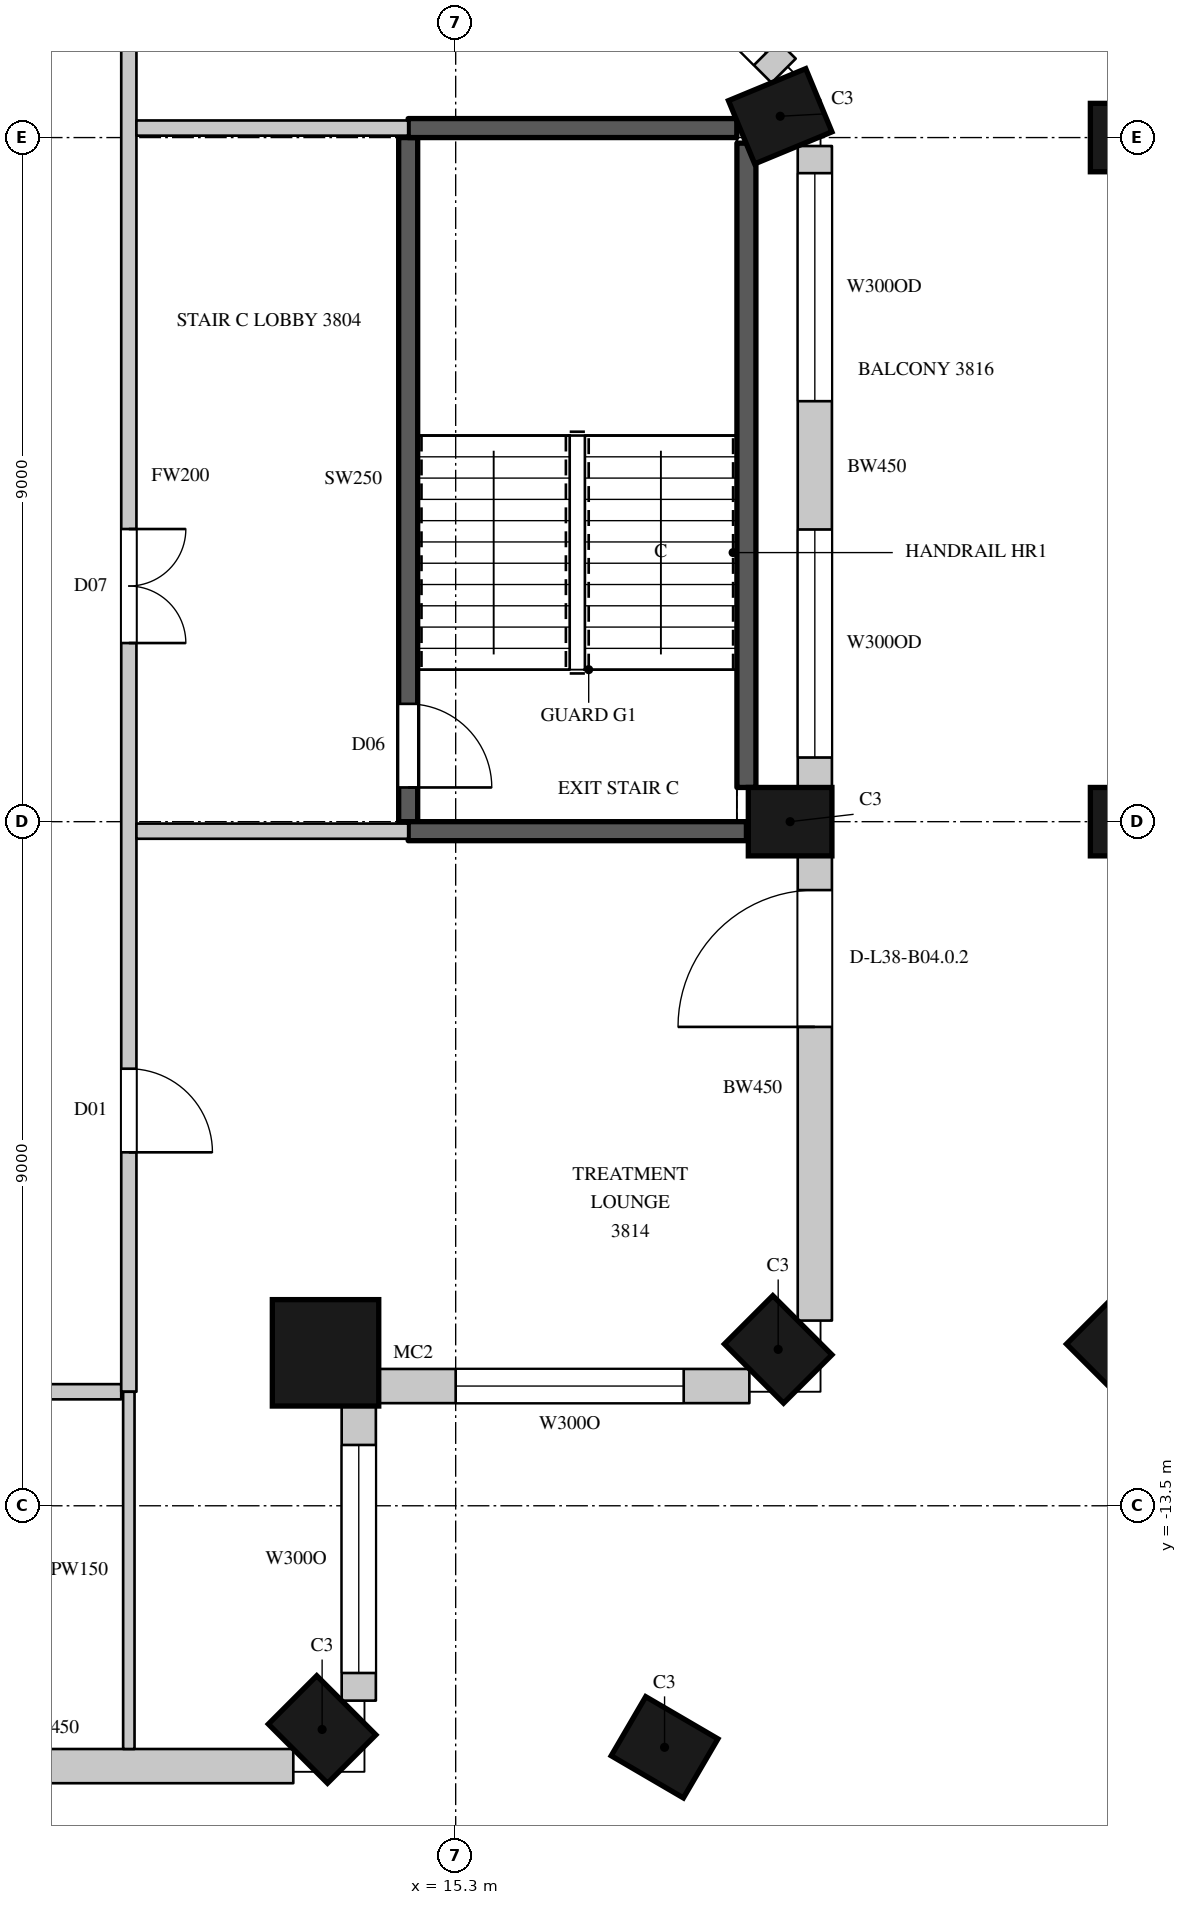
"""IFC4 building model, lengths in metres.
Left out: names, types, materials, properties, quantities, classifications, styles, units other than length and angle.
Written with IfcOpenShell. Run it as: python <this file> out.ifc"""

import sys

from ifc_helpers import new_model, si_unit, direction, frame, frame_2d, origin, origin_2d, place, context, subcontext, project, spatial, rectangle, circle, extrude, element, fill, save


model = new_model("IFC4")
c1 = context("Model", 3, precision=1e-05, world=origin(), true_north=direction((0.0, 1.0)))
c2 = subcontext(c1, "Body", "Model", "MODEL_VIEW")
j1 = project(units=[si_unit("LENGTHUNIT", "METRE"), si_unit("PLANEANGLEUNIT", "RADIAN")], contexts=[c1])
p1 = place(None, origin())
s1 = spatial("IfcSite", under=j1, at=p1, CompositionType="ELEMENT")
p2 = place(p1, origin())
s2 = spatial("IfcBuilding", under=s1, at=p2, CompositionType="ELEMENT")
p3 = place(p2, frame((0.0, 0.0, 176.9)))
s3 = spatial("IfcBuildingStorey", under=s2, at=p3, CompositionType="ELEMENT", Elevation=176.9)
p4 = place(p3, frame((13.543, -16.443, 0.0), z_axis=(0.0, 0.0, 1.0), x_axis=(0.707106781187, 0.707106781187, 0.0)))
e1 = element("IfcColumn", 1, at=p4, inside=s3, PredefinedType="COLUMN", context=c2, shape_type="SweptSolid", body=[
    extrude(rectangle(XDim=0.9, YDim=1.1, at=origin_2d()), origin(), (0.0, 0.0, 1.0), 4.1),
])
p5 = place(p3, frame((13.588, -11.488, 0.0), z_axis=(0.0, 0.0, 1.0), x_axis=(1.0, 0.0, 0.0)))
e2 = element("IfcColumn", 2, at=p5, inside=s3, PredefinedType="COLUMN", context=c2, shape_type="SweptSolid", body=[
    extrude(circle(Radius=0.7, at=origin_2d()), origin(), (0.0, 0.0, 1.0), 4.1),
])
for number, where, z_axis, x_axis in (
    (3, (19.543, -11.443, 0.0), (0.0, 0.0, 1.0), (0.707, 0.707, 0.0)),
    (4, (19.7, -4.5, 0.0), (0.0, 0.0, 1.0), (0.0, 1.0, 0.0)),
    (5, (19.57, 4.78, 0.0), (0.0, 0.0, 1.0), (-0.383, 0.924, 0.0)),
    (6, (18.048, -16.677, 0.0), (0.0, 0.0, 1.0), (0.504, 0.863, 0.0)),
    (7, (24.043, -11.443, 0.0), (0.0, 0.0, 1.0), (0.707, 0.707, 0.0)),
    (8, (24.2, -4.5, 0.0), (0.0, 0.0, 1.0), (0.0, 1.0, 0.0)),
    (9, (24.2, 4.5, 0.0), (0.0, 0.0, 1.0), (0.0, 1.0, 0.0)),
):
    element("IfcColumn", number, at=place(p3, frame(where, z_axis=z_axis, x_axis=x_axis)), inside=s3, PredefinedType="COLUMN", context=c2, shape_type="SweptSolid", body=[
        extrude(rectangle(XDim=0.9, YDim=1.1, at=origin_2d()), origin(), (0.0, 0.0, 1.0), 4.1),
    ])
p6 = place(p3, frame((6.75, -16.925, 0.0), z_axis=(0.0, 0.0, 1.0), x_axis=(1.0, 0.0, 0.0)))
e10 = element("IfcWall", 10, at=p6, inside=s3, PredefinedType="SOLIDWALL", context=c2, shape_type="SweptSolid", body=[
    extrude(rectangle(XDim=6.414, YDim=0.45, at=frame_2d((3.207, 0.0))), origin(), (0.0, 0.0, 1.0), 3.8),
])
p7 = place(p6, frame((0.525, 0.0, 0.0)))
e11 = element("IfcOpeningElement", 11, at=p7, cuts=e10, PredefinedType="OPENING", context=c2, shape_type="SweptSolid", body=[
    extrude(rectangle(XDim=1.8, YDim=2.4, at=frame_2d((0.9, 1.2))), frame((0.0, 0.235, 0.0), z_axis=(0.0, -1.0, 0.0), x_axis=(1.0, 0.0, 0.0)), (0.0, 0.0, 1.0), 0.47),
])
p8 = place(p3, frame((14.025, -16.064, 0.0), z_axis=(0.0, 0.0, 1.0), x_axis=(0.0, 1.0, 0.0)))
e12 = element("IfcWall", 12, at=p8, inside=s3, PredefinedType="SOLIDWALL", context=c2, shape_type="SweptSolid", body=[
    extrude(rectangle(XDim=3.909, YDim=0.45, at=frame_2d((1.955, 0.0))), origin(), (0.0, 0.0, 1.0), 3.8),
])
p9 = place(p8, frame((0.364, 0.0, 1.05)))
e13 = element("IfcOpeningElement", 13, at=p9, cuts=e12, PredefinedType="OPENING", context=c2, shape_type="SweptSolid", body=[
    extrude(rectangle(XDim=3.0, YDim=2.4, at=frame_2d((1.5, 1.2))), frame((0.0, 0.235, 0.0), z_axis=(0.0, -1.0, 0.0), x_axis=(1.0, 0.0, 0.0)), (0.0, 0.0, 1.0), 0.47),
])
p10 = place(p3, frame((14.255, -11.925, 0.0), z_axis=(0.0, 0.0, 1.0), x_axis=(1.0, 0.0, 0.0)))
e14 = element("IfcWall", 14, at=p10, inside=s3, PredefinedType="SOLIDWALL", context=c2, shape_type="SweptSolid", body=[
    extrude(rectangle(XDim=4.909, YDim=0.45, at=frame_2d((2.455, 0.0))), origin(), (0.0, 0.0, 1.0), 3.8),
])
p11 = place(p10, frame((1.045, 0.0, 1.05)))
e15 = element("IfcOpeningElement", 15, at=p11, cuts=e14, PredefinedType="OPENING", context=c2, shape_type="SweptSolid", body=[
    extrude(rectangle(XDim=3.0, YDim=2.4, at=frame_2d((1.5, 1.2))), frame((0.0, 0.235, 0.0), z_axis=(0.0, -1.0, 0.0), x_axis=(1.0, 0.0, 0.0)), (0.0, 0.0, 1.0), 0.47),
])
p12 = place(p3, frame((20.025, -11.064, 0.0), z_axis=(0.0, 0.0, 1.0), x_axis=(0.0, 1.0, 0.0)))
e16 = element("IfcWall", 16, at=p12, inside=s3, PredefinedType="SOLIDWALL", context=c2, shape_type="SweptSolid", body=[
    extrude(rectangle(XDim=6.114, YDim=0.45, at=frame_2d((3.057, 0.0))), origin(), (0.0, 0.0, 1.0), 3.8),
])
p13 = place(p12, frame((3.864, 0.0, 0.0)))
e17 = element("IfcOpeningElement", 17, at=p13, cuts=e16, PredefinedType="OPENING", context=c2, shape_type="SweptSolid", body=[
    extrude(rectangle(XDim=1.8, YDim=2.4, at=frame_2d((0.9, 1.2))), frame((0.0, 0.235, 0.0), z_axis=(0.0, -1.0, 0.0), x_axis=(1.0, 0.0, 0.0)), (0.0, 0.0, 1.0), 0.47),
])
p14 = place(p3, frame((20.025, -4.05, 0.0), z_axis=(0.0, 0.0, 1.0), x_axis=(0.0, 1.0, 0.0)))
e18 = element("IfcWall", 18, at=p14, inside=s3, PredefinedType="SOLIDWALL", context=c2, shape_type="SweptSolid", body=[
    extrude(rectangle(XDim=8.439, YDim=0.45, at=frame_2d((4.219, 0.0))), origin(), (0.0, 0.0, 1.0), 3.8),
])
p15 = place(p14, frame((0.394, 0.0, 1.05)))
e19 = element("IfcOpeningElement", 19, at=p15, cuts=e18, PredefinedType="OPENING", context=c2, shape_type="SweptSolid", body=[
    extrude(rectangle(XDim=3.0, YDim=2.4, at=frame_2d((1.5, 1.2))), frame((0.0, 0.235, 0.0), z_axis=(0.0, -1.0, 0.0), x_axis=(1.0, 0.0, 0.0)), (0.0, 0.0, 1.0), 0.47),
])
p16 = place(p14, frame((5.082, 0.0, 1.05)))
e20 = element("IfcOpeningElement", 20, at=p16, cuts=e18, PredefinedType="OPENING", context=c2, shape_type="SweptSolid", body=[
    extrude(rectangle(XDim=3.0, YDim=2.4, at=frame_2d((1.5, 1.2))), frame((0.0, 0.235, 0.0), z_axis=(0.0, -1.0, 0.0), x_axis=(1.0, 0.0, 0.0)), (0.0, 0.0, 1.0), 0.47),
])
p17 = place(p3, frame((19.615, 5.379, 0.0), z_axis=(0.0, 0.0, 1.0), x_axis=(-0.707089646058, 0.7071239159, 0.0)))
e21 = element("IfcWall", 21, at=p17, inside=s3, PredefinedType="SOLIDWALL", context=c2, shape_type="SweptSolid", body=[
    extrude(rectangle(XDim=7.124, YDim=0.45, at=frame_2d((3.562, 0.0))), origin(), (0.0, 0.0, 1.0), 3.8),
])
p18 = place(p17, frame((0.328, 0.0, 1.05)))
e22 = element("IfcOpeningElement", 22, at=p18, cuts=e21, PredefinedType="OPENING", context=c2, shape_type="SweptSolid", body=[
    extrude(rectangle(XDim=2.4, YDim=2.4, at=frame_2d((1.2, 1.2))), frame((0.0, 0.235, 0.0), z_axis=(0.0, -1.0, 0.0), x_axis=(1.0, 0.0, 0.0)), (0.0, 0.0, 1.0), 0.47),
])
p19 = place(p17, frame((4.359, 0.0, 1.05)))
e23 = element("IfcOpeningElement", 23, at=p19, cuts=e21, PredefinedType="OPENING", context=c2, shape_type="SweptSolid", body=[
    extrude(rectangle(XDim=2.4, YDim=2.4, at=frame_2d((1.2, 1.2))), frame((0.0, 0.235, 0.0), z_axis=(0.0, -1.0, 0.0), x_axis=(1.0, 0.0, 0.0)), (0.0, 0.0, 1.0), 0.47),
])
p20 = place(p3, frame((21.1, -0.617, 0.0), z_axis=(0.0, 0.0, 1.0), x_axis=(0.0, 1.0, 0.0)))
e24 = element("IfcWall", 24, at=p20, inside=s3, PredefinedType="SOLIDWALL", context=c2, shape_type="SweptSolid", body=[
    extrude(rectangle(XDim=2.567, YDim=0.45, at=frame_2d((1.283, 0.0))), origin(), (0.0, 0.0, 1.0), 0.6),
])
p21 = place(p3, frame((-10.9, -12.0, 0.0), z_axis=(0.0, 0.0, 1.0), x_axis=(1.0, 0.0, 0.0)))
e25 = element("IfcWall", 25, at=p21, inside=s3, PredefinedType="PARTITIONING", context=c2, shape_type="SweptSolid", body=[
    extrude(rectangle(XDim=21.8, YDim=0.2, at=frame_2d((10.9, 0.0))), origin(), (0.0, 0.0, 1.0), 3.8),
])
p22 = place(p21, frame((0.95, 0.0, 0.0)))
e26 = element("IfcOpeningElement", 26, at=p22, cuts=e25, PredefinedType="OPENING", context=c2, shape_type="SweptSolid", body=[
    extrude(rectangle(XDim=0.9, YDim=2.2, at=frame_2d((0.45, 1.1))), frame((0.0, 0.11, 0.0), z_axis=(0.0, -1.0, 0.0), x_axis=(1.0, 0.0, 0.0)), (0.0, 0.0, 1.0), 0.22),
])
p23 = place(p21, frame((3.95, 0.0, 0.0)))
e27 = element("IfcOpeningElement", 27, at=p23, cuts=e25, PredefinedType="OPENING", context=c2, shape_type="SweptSolid", body=[
    extrude(rectangle(XDim=0.9, YDim=2.2, at=frame_2d((0.45, 1.1))), frame((0.0, 0.11, 0.0), z_axis=(0.0, -1.0, 0.0), x_axis=(1.0, 0.0, 0.0)), (0.0, 0.0, 1.0), 0.22),
])
p24 = place(p21, frame((6.7, 0.0, 0.0)))
e28 = element("IfcOpeningElement", 28, at=p24, cuts=e25, PredefinedType="OPENING", context=c2, shape_type="SweptSolid", body=[
    extrude(rectangle(XDim=0.9, YDim=2.2, at=frame_2d((0.45, 1.1))), frame((0.0, 0.11, 0.0), z_axis=(0.0, -1.0, 0.0), x_axis=(1.0, 0.0, 0.0)), (0.0, 0.0, 1.0), 0.22),
])
p25 = place(p21, frame((10.0, 0.0, 0.0)))
e29 = element("IfcOpeningElement", 29, at=p25, cuts=e25, PredefinedType="OPENING", context=c2, shape_type="SweptSolid", body=[
    extrude(rectangle(XDim=0.9, YDim=2.2, at=frame_2d((0.45, 1.1))), frame((0.0, 0.11, 0.0), z_axis=(0.0, -1.0, 0.0), x_axis=(1.0, 0.0, 0.0)), (0.0, 0.0, 1.0), 0.22),
])
p26 = place(p21, frame((13.55, 0.0, 0.0)))
e30 = element("IfcOpeningElement", 30, at=p26, cuts=e25, PredefinedType="OPENING", context=c2, shape_type="SweptSolid", body=[
    extrude(rectangle(XDim=0.9, YDim=2.2, at=frame_2d((0.45, 1.1))), frame((0.0, 0.11, 0.0), z_axis=(0.0, -1.0, 0.0), x_axis=(1.0, 0.0, 0.0)), (0.0, 0.0, 1.0), 0.22),
])
p27 = place(p21, frame((15.8, 0.0, 0.0)))
e31 = element("IfcOpeningElement", 31, at=p27, cuts=e25, PredefinedType="OPENING", context=c2, shape_type="SweptSolid", body=[
    extrude(rectangle(XDim=1.1, YDim=2.4, at=frame_2d((0.55, 1.2))), frame((0.0, 0.11, 0.0), z_axis=(0.0, -1.0, 0.0), x_axis=(1.0, 0.0, 0.0)), (0.0, 0.0, 1.0), 0.22),
])
p28 = place(p21, frame((18.0, 0.0, 0.0)))
e32 = element("IfcOpeningElement", 32, at=p28, cuts=e25, PredefinedType="OPENING", context=c2, shape_type="SweptSolid", body=[
    extrude(rectangle(XDim=1.1, YDim=2.4, at=frame_2d((0.55, 1.2))), frame((0.0, 0.11, 0.0), z_axis=(0.0, -1.0, 0.0), x_axis=(1.0, 0.0, 0.0)), (0.0, 0.0, 1.0), 0.22),
])
p29 = place(p3, frame((11.0, -12.0, 0.0), z_axis=(0.0, 0.0, 1.0), x_axis=(0.0, 1.0, 0.0)))
e33 = element("IfcWall", 33, at=p29, inside=s3, PredefinedType="PARTITIONING", context=c2, shape_type="SweptSolid", body=[
    extrude(rectangle(XDim=24.1, YDim=0.2, at=frame_2d((12.05, 0.0))), origin(), (0.0, 0.0, 1.0), 3.8),
])
p30 = place(p29, frame((9.85, 0.0, 0.0)))
e34 = element("IfcOpeningElement", 34, at=p30, cuts=e33, PredefinedType="OPENING", context=c2, shape_type="SweptSolid", body=[
    extrude(rectangle(XDim=1.5, YDim=2.4, at=frame_2d((0.75, 1.2))), frame((0.0, 0.11, 0.0), z_axis=(0.0, -1.0, 0.0), x_axis=(1.0, 0.0, 0.0)), (0.0, 0.0, 1.0), 0.22),
])
p31 = place(p29, frame((3.15, 0.0, 0.0)))
e35 = element("IfcOpeningElement", 35, at=p31, cuts=e33, PredefinedType="OPENING", context=c2, shape_type="SweptSolid", body=[
    extrude(rectangle(XDim=1.1, YDim=2.4, at=frame_2d((0.55, 1.2))), frame((0.0, 0.11, 0.0), z_axis=(0.0, -1.0, 0.0), x_axis=(1.0, 0.0, 0.0)), (0.0, 0.0, 1.0), 0.22),
])
for number, where, z_axis, x_axis in (
    (36, (11.1, -4.625, 0.0), (0.0, 0.0, 1.0), (1.0, 0.0, 0.0)),
    (37, (11.1, 4.625, 0.0), (0.0, 0.0, 1.0), (1.0, 0.0, 0.0)),
):
    element("IfcWall", number, at=place(p3, frame(where, z_axis=z_axis, x_axis=x_axis)), inside=s3, PredefinedType="PARTITIONING", context=c2, shape_type="SweptSolid", body=[
        extrude(rectangle(XDim=3.575, YDim=0.2, at=frame_2d((1.788, 0.0))), origin(), (0.0, 0.0, 1.0), 3.8),
    ])
p32 = place(p3, frame((11.0, -16.7, 0.0), z_axis=(0.0, 0.0, 1.0), x_axis=(0.0, 1.0, 0.0)))
e38 = element("IfcWall", 38, at=p32, inside=s3, PredefinedType="PARTITIONING", context=c2, shape_type="SweptSolid", body=[
    extrude(rectangle(XDim=4.7, YDim=0.15, at=frame_2d((2.35, 0.0))), origin(), (0.0, 0.0, 1.0), 3.8),
])
p33 = place(p3, frame((14.675, -4.5, 0.0), z_axis=(0.0, 0.0, 1.0), x_axis=(0.0, 1.0, 0.0)))
e39 = element("IfcWall", 39, at=p33, inside=s3, PredefinedType="SHEAR", context=c2, shape_type="SweptSolid", body=[
    extrude(rectangle(XDim=9.0, YDim=0.25, at=frame_2d((4.5, 0.0))), origin(), (0.0, 0.0, 1.0), 3.8),
])
p34 = place(p33, frame((0.45, 0.0, 0.0)))
e40 = element("IfcOpeningElement", 40, at=p34, cuts=e39, PredefinedType="OPENING", context=c2, shape_type="SweptSolid", body=[
    extrude(rectangle(XDim=1.1, YDim=2.2, at=frame_2d((0.55, 1.1))), frame((0.0, 0.135, 0.0), z_axis=(0.0, -1.0, 0.0), x_axis=(1.0, 0.0, 0.0)), (0.0, 0.0, 1.0), 0.27),
])
p35 = place(p3, frame((14.675, -4.625, 0.0), z_axis=(0.0, 0.0, 1.0), x_axis=(1.0, 0.0, 0.0)))
e41 = element("IfcWall", 41, at=p35, inside=s3, PredefinedType="SHEAR", context=c2, shape_type="SweptSolid", body=[
    extrude(rectangle(XDim=4.45, YDim=0.25, at=frame_2d((2.225, 0.0))), origin(), (0.0, 0.0, 1.0), 3.8),
])
p36 = place(p3, frame((14.675, 4.625, 0.0), z_axis=(0.0, 0.0, 1.0), x_axis=(1.0, 0.0, 0.0)))
e42 = element("IfcWall", 42, at=p36, inside=s3, PredefinedType="SHEAR", context=c2, shape_type="SweptSolid", body=[
    extrude(rectangle(XDim=4.324, YDim=0.25, at=frame_2d((2.162, 0.0))), origin(), (0.0, 0.0, 1.0), 3.8),
])
p37 = place(p3, frame((19.125, -4.05, 0.0), z_axis=(0.0, 0.0, 1.0), x_axis=(0.0, 1.0, 0.0)))
e43 = element("IfcWall", 43, at=p37, inside=s3, PredefinedType="SHEAR", context=c2, shape_type="SweptSolid", body=[
    extrude(rectangle(XDim=8.477, YDim=0.25, at=frame_2d((4.238, 0.0))), origin(), (0.0, 0.0, 1.0), 3.8),
])
p38 = place(p9, origin())
e44 = element("IfcWindow", 44, at=p38, inside=s3, PartitioningType="SINGLE_PANEL", PredefinedType="WINDOW", context=c2, shape_type="SweptSolid", body=[
    extrude(rectangle(XDim=3.0, YDim=2.4, at=frame_2d((1.5, 1.2))), frame((0.0, 0.135, 0.0), z_axis=(0.0, -1.0, 0.0), x_axis=(1.0, 0.0, 0.0)), (0.0, 0.0, 1.0), 0.06),
])
fill(e13, e44)
p39 = place(p11, origin())
e45 = element("IfcWindow", 45, at=p39, inside=s3, PartitioningType="SINGLE_PANEL", PredefinedType="WINDOW", context=c2, shape_type="SweptSolid", body=[
    extrude(rectangle(XDim=3.0, YDim=2.4, at=frame_2d((1.5, 1.2))), frame((0.0, 0.135, 0.0), z_axis=(0.0, -1.0, 0.0), x_axis=(1.0, 0.0, 0.0)), (0.0, 0.0, 1.0), 0.06),
])
fill(e15, e45)
p40 = place(p13, origin())
e46 = element("IfcDoor", 46, at=p40, inside=s3, OperationType="SLIDING_TO_LEFT", PredefinedType="DOOR", context=c2, shape_type="SweptSolid", body=[
    extrude(rectangle(XDim=1.8, YDim=2.4, at=frame_2d((0.9, 1.2))), frame((0.0, 0.13, 0.0), z_axis=(0.0, -1.0, 0.0), x_axis=(1.0, 0.0, 0.0)), (0.0, 0.0, 1.0), 0.05),
])
fill(e17, e46)
p41 = place(p15, origin())
e47 = element("IfcWindow", 47, at=p41, inside=s3, PartitioningType="SINGLE_PANEL", PredefinedType="WINDOW", context=c2, shape_type="SweptSolid", body=[
    extrude(rectangle(XDim=3.0, YDim=2.4, at=frame_2d((1.5, 1.2))), frame((0.0, 0.135, 0.0), z_axis=(0.0, -1.0, 0.0), x_axis=(1.0, 0.0, 0.0)), (0.0, 0.0, 1.0), 0.06),
])
fill(e19, e47)
p42 = place(p16, origin())
e48 = element("IfcWindow", 48, at=p42, inside=s3, PartitioningType="SINGLE_PANEL", PredefinedType="WINDOW", context=c2, shape_type="SweptSolid", body=[
    extrude(rectangle(XDim=3.0, YDim=2.4, at=frame_2d((1.5, 1.2))), frame((0.0, 0.135, 0.0), z_axis=(0.0, -1.0, 0.0), x_axis=(1.0, 0.0, 0.0)), (0.0, 0.0, 1.0), 0.06),
])
fill(e20, e48)
p43 = place(p18, origin())
e49 = element("IfcWindow", 49, at=p43, inside=s3, PartitioningType="SINGLE_PANEL", PredefinedType="WINDOW", context=c2, shape_type="SweptSolid", body=[
    extrude(rectangle(XDim=2.4, YDim=2.4, at=frame_2d((1.2, 1.2))), frame((0.0, 0.135, 0.0), z_axis=(0.0, -1.0, 0.0), x_axis=(1.0, 0.0, 0.0)), (0.0, 0.0, 1.0), 0.06),
])
fill(e22, e49)
p44 = place(p30, origin())
e50 = element("IfcDoor", 50, at=p44, inside=s3, OperationType="DOUBLE_DOOR_SINGLE_SWING", PredefinedType="DOOR", context=c2, shape_type="SweptSolid", body=[
    extrude(rectangle(XDim=1.5, YDim=2.4, at=frame_2d((0.75, 1.2))), frame((0.0, 0.025, 0.0), z_axis=(0.0, -1.0, 0.0), x_axis=(1.0, 0.0, 0.0)), (0.0, 0.0, 1.0), 0.05),
])
fill(e34, e50)
p45 = place(p31, origin())
e51 = element("IfcDoor", 51, at=p45, inside=s3, OperationType="SINGLE_SWING_RIGHT", PredefinedType="DOOR", context=c2, shape_type="SweptSolid", body=[
    extrude(rectangle(XDim=1.1, YDim=2.4, at=frame_2d((0.55, 1.2))), frame((0.0, 0.025, 0.0), z_axis=(0.0, -1.0, 0.0), x_axis=(1.0, 0.0, 0.0)), (0.0, 0.0, 1.0), 0.05),
])
fill(e35, e51)
p46 = place(p34, origin())
e52 = element("IfcDoor", 52, at=p46, inside=s3, OperationType="SINGLE_SWING_RIGHT", PredefinedType="DOOR", context=c2, shape_type="SweptSolid", body=[
    extrude(rectangle(XDim=1.1, YDim=2.2, at=frame_2d((0.55, 1.1))), frame((0.0, 0.025, 0.0), z_axis=(0.0, -1.0, 0.0), x_axis=(1.0, 0.0, 0.0)), (0.0, 0.0, 1.0), 0.05),
])
fill(e40, e52)
save(model, sys.argv[1])
